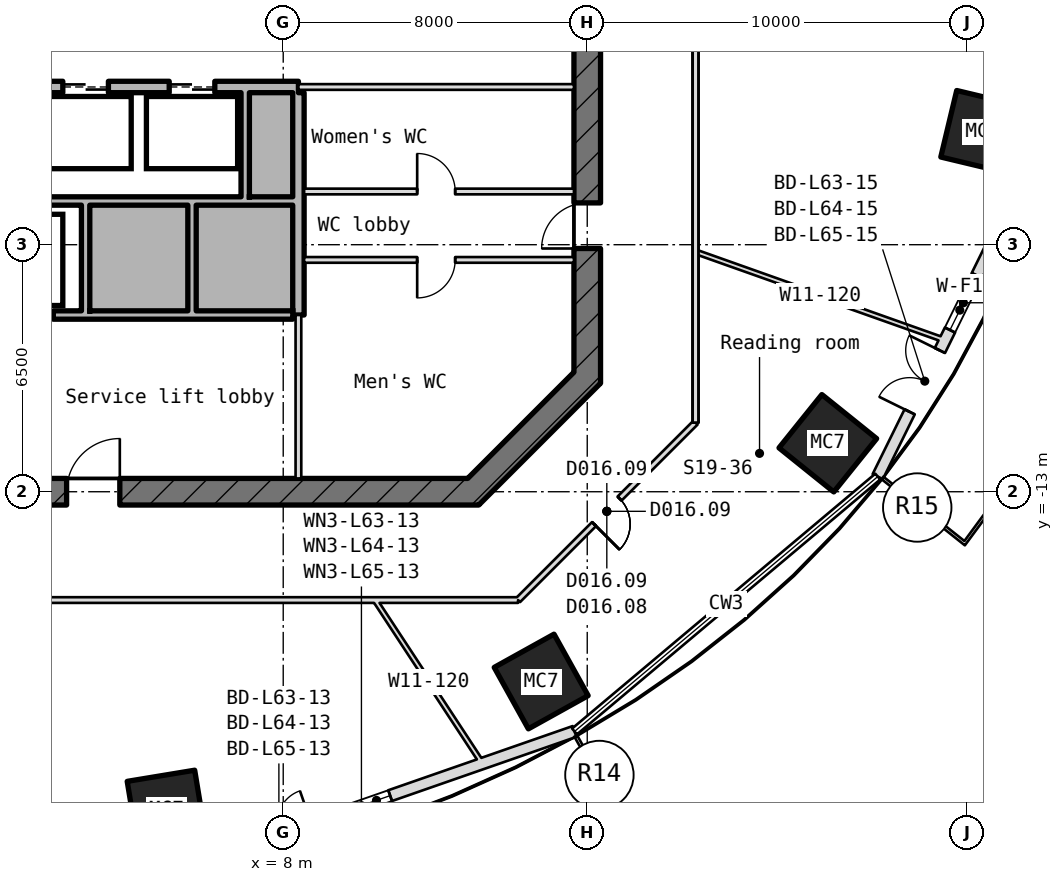
"""IFC4 building model, lengths in metres.
Left out: names, types, materials, properties, quantities, classifications, styles, units other than length and angle.
Written with IfcOpenShell. Run it as: python <this file> out.ifc"""

import sys

from ifc_helpers import new_model, si_unit, direction, frame, frame_2d, origin, origin_2d, place, context, subcontext, project, spatial, rectangle, hollow_rectangle, extrude, element, fill, save


model = new_model("IFC4")
c1 = context("Model", 3, precision=1e-05, world=origin(), true_north=direction((0.0, 1.0)))
c2 = subcontext(c1, "Body", "Model", "MODEL_VIEW")
j1 = project(units=[si_unit("LENGTHUNIT", "METRE"), si_unit("PLANEANGLEUNIT", "RADIAN")], contexts=[c1])
p1 = place(None, origin())
s1 = spatial("IfcSite", under=j1, at=p1, CompositionType="ELEMENT")
p2 = place(p1, origin())
s2 = spatial("IfcBuilding", under=s1, at=p2, CompositionType="ELEMENT")
p3 = place(p2, frame((0.0, 0.0, 284.5)))
s3 = spatial("IfcBuildingStorey", under=s2, at=p3, CompositionType="ELEMENT", Elevation=284.5)
for number, where, z_axis, x_axis in (
    (1, (4.933, -21.386, -0.18), (0.0, 0.0, 1.0), (-0.987, -0.163, 0.0)),
    (2, (14.788, -17.993, -0.18), (0.0, 0.0, 1.0), (-0.874, -0.486, 0.0)),
    (3, (22.331, -11.724, -0.18), (0.0, 0.0, 1.0), (-0.627, -0.779, 0.0)),
    (4, (26.413, -3.533, -0.18), (0.0, 0.0, 1.0), (-0.233, -0.973, 0.0)),
):
    element("IfcColumn", number, at=place(p3, frame(where, z_axis=z_axis, x_axis=x_axis)), inside=s3, PredefinedType="COLUMN", context=c2, shape_type="SweptSolid", body=[
        extrude(hollow_rectangle(XDim=1.8, YDim=1.85, WallThickness=0.06, at=origin_2d()), origin(), (0.0, 0.0, 1.0), 4.15),
    ])
p4 = place(p3, frame((5.242, -22.936, 0.0), z_axis=(0.0, 0.0, 1.0), x_axis=(0.94441082719, 0.328767683155, 0.0)))
e5 = element("IfcWall", 5, at=p4, inside=s3, PredefinedType="SOLIDWALL", context=c2, shape_type="SweptSolid", body=[
    extrude(rectangle(XDim=11.038, YDim=0.3, at=frame_2d((5.519, 0.0))), origin(), (0.0, 0.0, 1.0), 3.97),
])
p5 = place(p4, frame((1.9, 0.0, 0.0)))
e6 = element("IfcOpeningElement", 6, at=p5, cuts=e5, PredefinedType="OPENING", context=c2, shape_type="SweptSolid", body=[
    extrude(rectangle(XDim=1.8, YDim=2.4, at=frame_2d((0.9, 1.2))), frame((0.0, 0.16, 0.0), z_axis=(0.0, -1.0, 0.0), x_axis=(1.0, 0.0, 0.0)), (0.0, 0.0, 1.0), 0.32),
])
p6 = place(p4, frame((4.3, 0.0, 0.9)))
e7 = element("IfcOpeningElement", 7, at=p6, cuts=e5, PredefinedType="OPENING", context=c2, shape_type="SweptSolid", body=[
    extrude(rectangle(XDim=1.6, YDim=1.5, at=frame_2d((0.8, 0.75))), frame((0.0, 0.16, 0.0), z_axis=(0.0, -1.0, 0.0), x_axis=(1.0, 0.0, 0.0)), (0.0, 0.0, 1.0), 0.32),
])
p7 = place(p3, frame((23.644, -12.602, 0.0), z_axis=(0.0, 0.0, 1.0), x_axis=(0.442107110685, 0.8969622638, 0.0)))
e8 = element("IfcWall", 8, at=p7, inside=s3, PredefinedType="SOLIDWALL", context=c2, shape_type="SweptSolid", body=[
    extrude(rectangle(XDim=9.767, YDim=0.3, at=frame_2d((4.884, 0.0))), origin(), (0.0, 0.0, 1.0), 3.97),
])
p8 = place(p7, frame((1.9, 0.0, 0.0)))
e9 = element("IfcOpeningElement", 9, at=p8, cuts=e8, PredefinedType="OPENING", context=c2, shape_type="SweptSolid", body=[
    extrude(rectangle(XDim=1.8, YDim=2.4, at=frame_2d((0.9, 1.2))), frame((0.0, 0.16, 0.0), z_axis=(0.0, -1.0, 0.0), x_axis=(1.0, 0.0, 0.0)), (0.0, 0.0, 1.0), 0.32),
])
p9 = place(p7, frame((4.3, 0.0, 0.9)))
e10 = element("IfcOpeningElement", 10, at=p9, cuts=e8, PredefinedType="OPENING", context=c2, shape_type="SweptSolid", body=[
    extrude(rectangle(XDim=1.6, YDim=1.5, at=frame_2d((0.8, 0.75))), frame((0.0, 0.16, 0.0), z_axis=(0.0, -1.0, 0.0), x_axis=(1.0, 0.0, 0.0)), (0.0, 0.0, 1.0), 0.32),
])
p10 = place(p3, frame((12.897, -13.103, -0.18), z_axis=(0.0, 0.0, 1.0), x_axis=(0.707106781187, 0.707106781187, 0.0)))
e11 = element("IfcWall", 11, at=p10, inside=s3, PredefinedType="SHEAR", context=c2, shape_type="SweptSolid", body=[
    extrude(rectangle(XDim=4.533, YDim=0.7, at=frame_2d((2.266, 0.0))), origin(), (0.0, 0.0, 1.0), 4.15),
])
p11 = place(p3, frame((16.0, -10.145, -0.18), z_axis=(0.0, 0.0, 1.0), x_axis=(0.0, 1.0, 0.0)))
e12 = element("IfcWall", 12, at=p11, inside=s3, PredefinedType="SHEAR", context=c2, shape_type="SweptSolid", body=[
    extrude(rectangle(XDim=20.29, YDim=0.7, at=frame_2d((10.145, 0.0))), origin(), (0.0, 0.0, 1.0), 4.15),
])
p12 = place(p11, frame((8.945, 0.0, 0.18)))
e13 = element("IfcOpeningElement", 13, at=p12, cuts=e12, PredefinedType="OPENING", context=c2, shape_type="SweptSolid", body=[
    extrude(rectangle(XDim=2.4, YDim=2.1, at=frame_2d((1.2, 1.05))), frame((0.0, 0.36, 0.0), z_axis=(0.0, -1.0, 0.0), x_axis=(1.0, 0.0, 0.0)), (0.0, 0.0, 1.0), 0.72),
])
p13 = place(p11, frame((13.545, 0.0, 0.18)))
e14 = element("IfcOpeningElement", 14, at=p13, cuts=e12, PredefinedType="OPENING", context=c2, shape_type="SweptSolid", body=[
    extrude(rectangle(XDim=1.2, YDim=2.1, at=frame_2d((0.6, 1.05))), frame((0.0, 0.36, 0.0), z_axis=(0.0, -1.0, 0.0), x_axis=(1.0, 0.0, 0.0)), (0.0, 0.0, 1.0), 0.72),
])
p14 = place(p11, frame((3.545, 0.0, 0.18)))
e15 = element("IfcOpeningElement", 15, at=p14, cuts=e12, PredefinedType="OPENING", context=c2, shape_type="SweptSolid", body=[
    extrude(rectangle(XDim=1.2, YDim=2.1, at=frame_2d((0.6, 1.05))), frame((0.0, 0.36, 0.0), z_axis=(0.0, -1.0, 0.0), x_axis=(1.0, 0.0, 0.0)), (0.0, 0.0, 1.0), 0.72),
])
p15 = place(p3, frame((-13.145, -13.0, -0.18), z_axis=(0.0, 0.0, 1.0), x_axis=(1.0, 0.0, 0.0)))
e16 = element("IfcWall", 16, at=p15, inside=s3, PredefinedType="SHEAR", context=c2, shape_type="SweptSolid", body=[
    extrude(rectangle(XDim=26.29, YDim=0.7, at=frame_2d((13.145, 0.0))), origin(), (0.0, 0.0, 1.0), 4.15),
])
p16 = place(p15, frame((2.845, 0.0, 0.18)))
e17 = element("IfcOpeningElement", 17, at=p16, cuts=e16, PredefinedType="OPENING", context=c2, shape_type="SweptSolid", body=[
    extrude(rectangle(XDim=1.2, YDim=2.1, at=frame_2d((0.6, 1.05))), frame((0.0, 0.36, 0.0), z_axis=(0.0, -1.0, 0.0), x_axis=(1.0, 0.0, 0.0)), (0.0, 0.0, 1.0), 0.72),
])
p17 = place(p15, frame((6.845, 0.0, 0.18)))
e18 = element("IfcOpeningElement", 18, at=p17, cuts=e16, PredefinedType="OPENING", context=c2, shape_type="SweptSolid", body=[
    extrude(rectangle(XDim=1.4, YDim=2.1, at=frame_2d((0.7, 1.05))), frame((0.0, 0.36, 0.0), z_axis=(0.0, -1.0, 0.0), x_axis=(1.0, 0.0, 0.0)), (0.0, 0.0, 1.0), 0.72),
])
p18 = place(p15, frame((15.445, 0.0, 0.18)))
e19 = element("IfcOpeningElement", 19, at=p18, cuts=e16, PredefinedType="OPENING", context=c2, shape_type="SweptSolid", body=[
    extrude(rectangle(XDim=1.4, YDim=2.1, at=frame_2d((0.7, 1.05))), frame((0.0, 0.36, 0.0), z_axis=(0.0, -1.0, 0.0), x_axis=(1.0, 0.0, 0.0)), (0.0, 0.0, 1.0), 0.72),
])
p19 = place(p3, frame((-2.69, -8.35, 0.0), z_axis=(0.0, 0.0, 1.0), x_axis=(1.0, 0.0, 0.0)))
e20 = element("IfcWall", 20, at=p19, inside=s3, PredefinedType="STANDARD", context=c2, shape_type="SweptSolid", body=[
    extrude(rectangle(XDim=10.94, YDim=0.22, at=frame_2d((5.47, 0.0))), origin(), (0.0, 0.0, 1.0), 3.97),
])
p20 = place(p19, frame((0.74, 0.0, 0.0)))
e21 = element("IfcOpeningElement", 21, at=p20, cuts=e20, PredefinedType="OPENING", context=c2, shape_type="SweptSolid", body=[
    extrude(rectangle(XDim=1.1, YDim=2.1, at=frame_2d((0.55, 1.05))), frame((0.0, 0.12, 0.0), z_axis=(0.0, -1.0, 0.0), x_axis=(1.0, 0.0, 0.0)), (0.0, 0.0, 1.0), 0.24),
])
p21 = place(p19, frame((3.54, 0.0, 0.0)))
e22 = element("IfcOpeningElement", 22, at=p21, cuts=e20, PredefinedType="OPENING", context=c2, shape_type="SweptSolid", body=[
    extrude(rectangle(XDim=1.1, YDim=2.1, at=frame_2d((0.55, 1.05))), frame((0.0, 0.12, 0.0), z_axis=(0.0, -1.0, 0.0), x_axis=(1.0, 0.0, 0.0)), (0.0, 0.0, 1.0), 0.24),
])
p22 = place(p3, frame((8.55, -6.9, 0.0), z_axis=(0.0, 0.0, 1.0), x_axis=(1.0, 0.0, 0.0)))
e23 = element("IfcWall", 23, at=p22, inside=s3, PredefinedType="PARTITIONING", context=c2, shape_type="SweptSolid", body=[
    extrude(rectangle(XDim=7.1, YDim=0.15, at=frame_2d((3.55, 0.0))), origin(), (0.0, 0.0, 1.0), 3.97),
])
p23 = place(p22, frame((2.975, 0.0, 0.0)))
e24 = element("IfcOpeningElement", 24, at=p23, cuts=e23, PredefinedType="OPENING", context=c2, shape_type="SweptSolid", body=[
    extrude(rectangle(XDim=1.0, YDim=2.1, at=frame_2d((0.5, 1.05))), frame((0.0, 0.085, 0.0), z_axis=(0.0, -1.0, 0.0), x_axis=(1.0, 0.0, 0.0)), (0.0, 0.0, 1.0), 0.17),
])
p24 = place(p3, frame((-8.25, -5.35, 0.0), z_axis=(0.0, 0.0, 1.0), x_axis=(1.0, 0.0, 0.0)))
e25 = element("IfcWall", 25, at=p24, inside=s3, PredefinedType="STANDARD", context=c2, shape_type="SweptSolid", body=[
    extrude(rectangle(XDim=16.5, YDim=0.22, at=frame_2d((8.25, 0.0))), origin(), (0.0, 0.0, 1.0), 3.97),
])
p25 = place(p3, frame((8.55, -5.1, 0.0), z_axis=(0.0, 0.0, 1.0), x_axis=(1.0, 0.0, 0.0)))
e26 = element("IfcWall", 26, at=p25, inside=s3, PredefinedType="PARTITIONING", context=c2, shape_type="SweptSolid", body=[
    extrude(rectangle(XDim=7.1, YDim=0.15, at=frame_2d((3.55, 0.0))), origin(), (0.0, 0.0, 1.0), 3.97),
])
p26 = place(p25, frame((2.975, 0.0, 0.0)))
e27 = element("IfcOpeningElement", 27, at=p26, cuts=e26, PredefinedType="OPENING", context=c2, shape_type="SweptSolid", body=[
    extrude(rectangle(XDim=1.0, YDim=2.1, at=frame_2d((0.5, 1.05))), frame((0.0, 0.085, 0.0), z_axis=(0.0, -1.0, 0.0), x_axis=(1.0, 0.0, 0.0)), (0.0, 0.0, 1.0), 0.17),
])
p27 = place(p3, frame((-8.4, -2.35, -0.18), z_axis=(0.0, 0.0, 1.0), x_axis=(1.0, 0.0, 0.0)))
e28 = element("IfcWall", 28, at=p27, inside=s3, PredefinedType="SHEAR", context=c2, shape_type="SweptSolid", body=[
    extrude(rectangle(XDim=16.8, YDim=0.3, at=frame_2d((8.4, 0.0))), origin(), (0.0, 0.0, 1.0), 4.15),
])
p28 = place(p27, frame((2.2, 0.0, 0.18)))
e29 = element("IfcOpeningElement", 29, at=p28, cuts=e28, PredefinedType="OPENING", context=c2, shape_type="SweptSolid", body=[
    extrude(rectangle(XDim=1.2, YDim=2.1, at=frame_2d((0.6, 1.05))), frame((0.0, 0.16, 0.0), z_axis=(0.0, -1.0, 0.0), x_axis=(1.0, 0.0, 0.0)), (0.0, 0.0, 1.0), 0.32),
])
p29 = place(p27, frame((5.0, 0.0, 0.18)))
e30 = element("IfcOpeningElement", 30, at=p29, cuts=e28, PredefinedType="OPENING", context=c2, shape_type="SweptSolid", body=[
    extrude(rectangle(XDim=1.2, YDim=2.1, at=frame_2d((0.6, 1.05))), frame((0.0, 0.16, 0.0), z_axis=(0.0, -1.0, 0.0), x_axis=(1.0, 0.0, 0.0)), (0.0, 0.0, 1.0), 0.32),
])
p30 = place(p27, frame((7.8, 0.0, 0.18)))
e31 = element("IfcOpeningElement", 31, at=p30, cuts=e28, PredefinedType="OPENING", context=c2, shape_type="SweptSolid", body=[
    extrude(rectangle(XDim=1.2, YDim=2.1, at=frame_2d((0.6, 1.05))), frame((0.0, 0.16, 0.0), z_axis=(0.0, -1.0, 0.0), x_axis=(1.0, 0.0, 0.0)), (0.0, 0.0, 1.0), 0.32),
])
p31 = place(p27, frame((10.6, 0.0, 0.18)))
e32 = element("IfcOpeningElement", 32, at=p31, cuts=e28, PredefinedType="OPENING", context=c2, shape_type="SweptSolid", body=[
    extrude(rectangle(XDim=1.2, YDim=2.1, at=frame_2d((0.6, 1.05))), frame((0.0, 0.16, 0.0), z_axis=(0.0, -1.0, 0.0), x_axis=(1.0, 0.0, 0.0)), (0.0, 0.0, 1.0), 0.32),
])
p32 = place(p27, frame((13.4, 0.0, 0.18)))
e33 = element("IfcOpeningElement", 33, at=p32, cuts=e28, PredefinedType="OPENING", context=c2, shape_type="SweptSolid", body=[
    extrude(rectangle(XDim=1.2, YDim=2.1, at=frame_2d((0.6, 1.05))), frame((0.0, 0.16, 0.0), z_axis=(0.0, -1.0, 0.0), x_axis=(1.0, 0.0, 0.0)), (0.0, 0.0, 1.0), 0.32),
])
p33 = place(p3, frame((8.4, -2.35, 0.0), z_axis=(0.0, 0.0, 1.0), x_axis=(1.0, 0.0, 0.0)))
e34 = element("IfcWall", 34, at=p33, inside=s3, PredefinedType="PARTITIONING", context=c2, shape_type="SweptSolid", body=[
    extrude(rectangle(XDim=7.25, YDim=0.15, at=frame_2d((3.625, 0.0))), origin(), (0.0, 0.0, 1.0), 3.97),
])
for number, where, z_axis, x_axis in (
    (35, (2.8, -8.24, 0.0), (0.0, 0.0, 1.0), (0.0, 1.0, 0.0)),
    (36, (5.6, -8.24, 0.0), (0.0, 0.0, 1.0), (0.0, 1.0, 0.0)),
):
    element("IfcWall", number, at=place(p3, frame(where, z_axis=z_axis, x_axis=x_axis)), inside=s3, PredefinedType="STANDARD", context=c2, shape_type="SweptSolid", body=[
        extrude(rectangle(XDim=2.78, YDim=0.22, at=frame_2d((1.39, 0.0))), origin(), (0.0, 0.0, 1.0), 3.97),
    ])
p34 = place(p3, frame((7.0, -5.24, 0.0), z_axis=(0.0, 0.0, 1.0), x_axis=(0.0, 1.0, 0.0)))
e37 = element("IfcWall", 37, at=p34, inside=s3, PredefinedType="STANDARD", context=c2, shape_type="SweptSolid", body=[
    extrude(rectangle(XDim=2.74, YDim=0.22, at=frame_2d((1.37, 0.0))), origin(), (0.0, 0.0, 1.0), 3.97),
])
p35 = place(p3, frame((8.4, -12.65, 0.0), z_axis=(0.0, 0.0, 1.0), x_axis=(0.0, 1.0, 0.0)))
e38 = element("IfcWall", 38, at=p35, inside=s3, PredefinedType="PARTITIONING", context=c2, shape_type="SweptSolid", body=[
    extrude(rectangle(XDim=4.3, YDim=0.15, at=frame_2d((2.15, 0.0))), origin(), (0.0, 0.0, 1.0), 3.97),
])
p36 = place(p3, frame((8.4, -8.35, -0.18), z_axis=(0.0, 0.0, 1.0), x_axis=(0.0, 1.0, 0.0)))
e39 = element("IfcWall", 39, at=p36, inside=s3, PredefinedType="SHEAR", context=c2, shape_type="SweptSolid", body=[
    extrude(rectangle(XDim=5.85, YDim=0.3, at=frame_2d((2.925, 0.0))), origin(), (0.0, 0.0, 1.0), 4.15),
])
p37 = place(p3, frame((10.414, -15.85, 0.0), z_axis=(0.0, 0.0, 1.0), x_axis=(0.549083233683, -0.835767672555, 0.0)))
e40 = element("IfcWall", 40, at=p37, inside=s3, PredefinedType="PARTITIONING", context=c2, shape_type="SweptSolid", body=[
    extrude(rectangle(XDim=5.147, YDim=0.12, at=frame_2d((2.573, 0.0))), origin(), (0.0, 0.0, 1.0), 3.97),
])
p38 = place(p3, frame((14.18, -15.85, 0.0), z_axis=(0.0, 0.0, 1.0), x_axis=(-1.0, 0.0, 0.0)))
e41 = element("IfcWall", 41, at=p38, inside=s3, PredefinedType="PARTITIONING", context=c2, shape_type="SweptSolid", body=[
    extrude(rectangle(XDim=28.361, YDim=0.15, at=frame_2d((14.18, 0.0))), origin(), (0.0, 0.0, 1.0), 3.97),
])
p39 = place(p38, frame((21.155, 0.0, 0.0)))
e42 = element("IfcOpeningElement", 42, at=p39, cuts=e41, PredefinedType="OPENING", context=c2, shape_type="SweptSolid", body=[
    extrude(rectangle(XDim=1.8, YDim=2.1, at=frame_2d((0.9, 1.05))), frame((0.0, 0.085, 0.0), z_axis=(0.0, -1.0, 0.0), x_axis=(1.0, 0.0, 0.0)), (0.0, 0.0, 1.0), 0.17),
])
p40 = place(p3, frame((18.85, -11.18, 0.0), z_axis=(0.0, 0.0, 1.0), x_axis=(-0.707106781187, -0.707106781187, 0.0)))
e43 = element("IfcWall", 43, at=p40, inside=s3, PredefinedType="PARTITIONING", context=c2, shape_type="SweptSolid", body=[
    extrude(rectangle(XDim=6.604, YDim=0.15, at=frame_2d((3.302, 0.0))), origin(), (0.0, 0.0, 1.0), 3.97),
])
p41 = place(p40, frame((2.827, 0.0, 0.0)))
e44 = element("IfcOpeningElement", 44, at=p41, cuts=e43, PredefinedType="OPENING", context=c2, shape_type="SweptSolid", body=[
    extrude(rectangle(XDim=0.95, YDim=2.1, at=frame_2d((0.475, 1.05))), frame((0.0, 0.085, 0.0), z_axis=(0.0, -1.0, 0.0), x_axis=(1.0, 0.0, 0.0)), (0.0, 0.0, 1.0), 0.17),
])
p42 = place(p3, frame((18.85, -6.686, 0.0), z_axis=(0.0, 0.0, 1.0), x_axis=(0.942465522023, -0.334303364923, 0.0)))
e45 = element("IfcWall", 45, at=p42, inside=s3, PredefinedType="PARTITIONING", context=c2, shape_type="SweptSolid", body=[
    extrude(rectangle(XDim=6.963, YDim=0.12, at=frame_2d((3.482, 0.0))), origin(), (0.0, 0.0, 1.0), 3.97),
])
p43 = place(p3, frame((18.85, 11.18, 0.0), z_axis=(0.0, 0.0, 1.0), x_axis=(0.0, -1.0, 0.0)))
e46 = element("IfcWall", 46, at=p43, inside=s3, PredefinedType="PARTITIONING", context=c2, shape_type="SweptSolid", body=[
    extrude(rectangle(XDim=22.361, YDim=0.15, at=frame_2d((11.18, 0.0))), origin(), (0.0, 0.0, 1.0), 3.97),
])
p44 = place(p43, frame((9.175, 0.0, 0.0)))
e47 = element("IfcOpeningElement", 47, at=p44, cuts=e46, PredefinedType="OPENING", context=c2, shape_type="SweptSolid", body=[
    extrude(rectangle(XDim=0.95, YDim=2.1, at=frame_2d((0.475, 1.05))), frame((0.0, 0.085, 0.0), z_axis=(0.0, -1.0, 0.0), x_axis=(1.0, 0.0, 0.0)), (0.0, 0.0, 1.0), 0.17),
])
p45 = place(p6, origin())
e48 = element("IfcWindow", 48, at=p45, inside=s3, PartitioningType="SINGLE_PANEL", PredefinedType="WINDOW", context=c2, shape_type="SweptSolid", body=[
    extrude(rectangle(XDim=1.6, YDim=1.5, at=frame_2d((0.8, 0.75))), frame((0.0, 0.03, 0.0), z_axis=(0.0, -1.0, 0.0), x_axis=(1.0, 0.0, 0.0)), (0.0, 0.0, 1.0), 0.06),
])
fill(e7, e48)
p46 = place(p8, origin())
e49 = element("IfcDoor", 49, at=p46, inside=s3, OperationType="SINGLE_SWING_LEFT", PredefinedType="DOOR", context=c2, shape_type="SweptSolid", body=[
    extrude(rectangle(XDim=1.8, YDim=2.4, at=frame_2d((0.9, 1.2))), frame((0.0, 0.025, 0.0), z_axis=(0.0, -1.0, 0.0), x_axis=(1.0, 0.0, 0.0)), (0.0, 0.0, 1.0), 0.05),
])
fill(e9, e49)
p47 = place(p9, origin())
e50 = element("IfcWindow", 50, at=p47, inside=s3, PartitioningType="SINGLE_PANEL", PredefinedType="WINDOW", context=c2, shape_type="SweptSolid", body=[
    extrude(rectangle(XDim=1.6, YDim=1.5, at=frame_2d((0.8, 0.75))), frame((0.0, 0.03, 0.0), z_axis=(0.0, -1.0, 0.0), x_axis=(1.0, 0.0, 0.0)), (0.0, 0.0, 1.0), 0.06),
])
fill(e10, e50)
p48 = place(p31, origin())
e51 = element("IfcDoor", 51, at=p48, inside=s3, OperationType="DOUBLE_DOOR_SLIDING", PredefinedType="DOOR", context=c2, shape_type="SweptSolid", body=[
    extrude(rectangle(XDim=1.2, YDim=2.1, at=frame_2d((0.6, 1.05))), frame((0.0, 0.025, 0.0), z_axis=(0.0, -1.0, 0.0), x_axis=(1.0, 0.0, 0.0)), (0.0, 0.0, 1.0), 0.05),
])
fill(e32, e51)
p49 = place(p32, origin())
e52 = element("IfcDoor", 52, at=p49, inside=s3, OperationType="DOUBLE_DOOR_SLIDING", PredefinedType="DOOR", context=c2, shape_type="SweptSolid", body=[
    extrude(rectangle(XDim=1.2, YDim=2.1, at=frame_2d((0.6, 1.05))), frame((0.0, 0.025, 0.0), z_axis=(0.0, -1.0, 0.0), x_axis=(1.0, 0.0, 0.0)), (0.0, 0.0, 1.0), 0.05),
])
fill(e33, e52)
p50 = place(p21, origin())
e53 = element("IfcDoor", 53, at=p50, inside=s3, OperationType="DOUBLE_DOOR_SLIDING", PredefinedType="DOOR", context=c2, shape_type="SweptSolid", body=[
    extrude(rectangle(XDim=1.1, YDim=2.1, at=frame_2d((0.55, 1.05))), frame((0.0, 0.025, 0.0), z_axis=(0.0, -1.0, 0.0), x_axis=(1.0, 0.0, 0.0)), (0.0, 0.0, 1.0), 0.05),
])
fill(e22, e53)
p51 = place(p18, origin())
e54 = element("IfcDoor", 54, at=p51, inside=s3, OperationType="SINGLE_SWING_RIGHT", PredefinedType="DOOR", context=c2, shape_type="SweptSolid", body=[
    extrude(rectangle(XDim=1.4, YDim=2.1, at=frame_2d((0.7, 1.05))), frame((0.0, 0.025, 0.0), z_axis=(0.0, -1.0, 0.0), x_axis=(1.0, 0.0, 0.0)), (0.0, 0.0, 1.0), 0.05),
])
fill(e19, e54)
p52 = place(p26, origin())
e55 = element("IfcDoor", 55, at=p52, inside=s3, OperationType="SINGLE_SWING_RIGHT", PredefinedType="DOOR", context=c2, shape_type="SweptSolid", body=[
    extrude(rectangle(XDim=1.0, YDim=2.1, at=frame_2d((0.5, 1.05))), frame((0.0, 0.025, 0.0), z_axis=(0.0, -1.0, 0.0), x_axis=(1.0, 0.0, 0.0)), (0.0, 0.0, 1.0), 0.05),
])
fill(e27, e55)
p53 = place(p14, origin())
e56 = element("IfcDoor", 56, at=p53, inside=s3, OperationType="SINGLE_SWING_RIGHT", PredefinedType="DOOR", context=c2, shape_type="SweptSolid", body=[
    extrude(rectangle(XDim=1.2, YDim=2.1, at=frame_2d((0.6, 1.05))), frame((0.0, 0.025, 0.0), z_axis=(0.0, -1.0, 0.0), x_axis=(1.0, 0.0, 0.0)), (0.0, 0.0, 1.0), 0.05),
])
fill(e15, e56)
p54 = place(p23, frame((1.0, 0.0, 0.0), z_axis=(0.0, 0.0, 1.0), x_axis=(-1.0, 0.0, 0.0)))
e57 = element("IfcDoor", 57, at=p54, inside=s3, OperationType="SINGLE_SWING_LEFT", PredefinedType="DOOR", context=c2, shape_type="SweptSolid", body=[
    extrude(rectangle(XDim=1.0, YDim=2.1, at=frame_2d((0.5, 1.05))), frame((0.0, 0.025, 0.0), z_axis=(0.0, -1.0, 0.0), x_axis=(1.0, 0.0, 0.0)), (0.0, 0.0, 1.0), 0.05),
])
fill(e24, e57)
p55 = place(p41, origin())
e58 = element("IfcDoor", 58, at=p55, inside=s3, OperationType="SINGLE_SWING_RIGHT", PredefinedType="DOOR", context=c2, shape_type="SweptSolid", body=[
    extrude(rectangle(XDim=0.95, YDim=2.1, at=frame_2d((0.475, 1.05))), frame((0.0, 0.025, 0.0), z_axis=(0.0, -1.0, 0.0), x_axis=(1.0, 0.0, 0.0)), (0.0, 0.0, 1.0), 0.05),
])
fill(e44, e58)
save(model, sys.argv[1])
